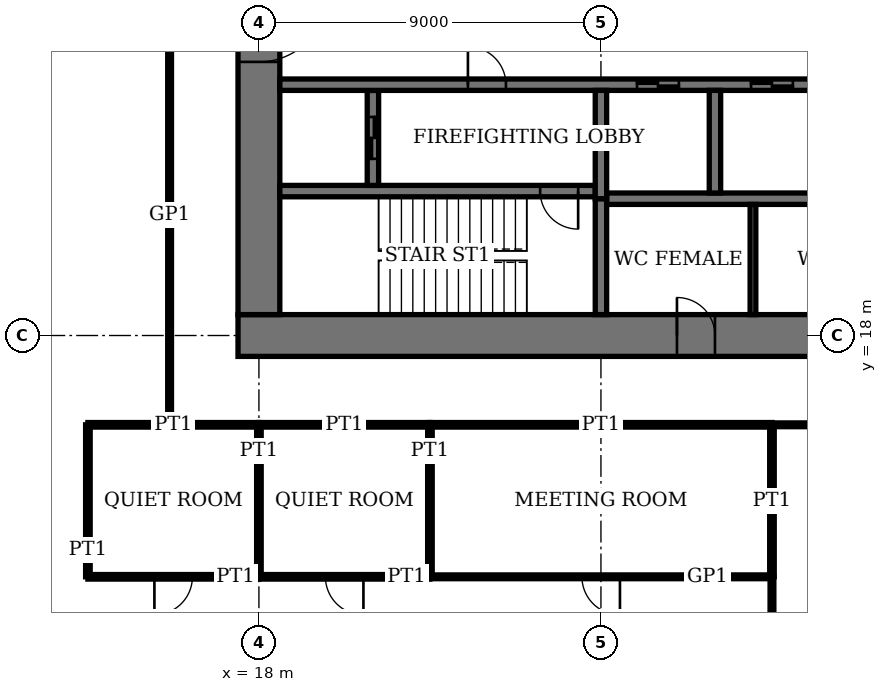
"""IFC4 building model, lengths in metres.
Left out: names, types, materials, properties, quantities, classifications, styles, units other than length and angle.
Written with IfcOpenShell. Run it as: python <this file> out.ifc"""

import sys

from ifc_helpers import new_model, si_unit, direction, frame, frame_2d, origin, place, context, subcontext, project, spatial, rectangle, extrude, element, fill, save


model = new_model("IFC4")
c1 = context("Model", 3, precision=1e-05, world=origin(), true_north=direction((0.0, 1.0)))
c2 = subcontext(c1, "Body", "Model", "MODEL_VIEW")
j1 = project(units=[si_unit("LENGTHUNIT", "METRE"), si_unit("PLANEANGLEUNIT", "RADIAN")], contexts=[c1])
p1 = place(None, origin())
s1 = spatial("IfcSite", under=j1, at=p1, CompositionType="ELEMENT")
p2 = place(p1, origin())
s2 = spatial("IfcBuilding", under=s1, at=p2, CompositionType="ELEMENT")
p3 = place(p2, frame((0.0, 0.0, 67.8)))
s3 = spatial("IfcBuildingStorey", under=s2, at=p3, CompositionType="ELEMENT", Elevation=67.8)
p4 = place(p3, frame((17.45, 18.0, 0.0), z_axis=(0.0, 0.0, 1.0), x_axis=(1.0, 0.0, 0.0)))
e1 = element("IfcWall", 1, at=p4, inside=s3, PredefinedType="SHEAR", context=c2, shape_type="SweptSolid", body=[
    extrude(rectangle(XDim=28.1, YDim=1.1, at=frame_2d((14.05, 0.0))), origin(), (0.0, 0.0, 1.0), 4.0),
])
p5 = place(p4, frame((11.55, 0.0, 0.0)))
e2 = element("IfcOpeningElement", 2, at=p5, cuts=e1, PredefinedType="OPENING", context=c2, shape_type="SweptSolid", body=[
    extrude(rectangle(XDim=1.0, YDim=2.4, at=frame_2d((0.5, 1.2))), frame((0.0, 0.56, 0.0), z_axis=(0.0, -1.0, 0.0), x_axis=(1.0, 0.0, 0.0)), (0.0, 0.0, 1.0), 1.12),
])
p6 = place(p4, frame((16.55, 0.0, 0.0)))
e3 = element("IfcOpeningElement", 3, at=p6, cuts=e1, PredefinedType="OPENING", context=c2, shape_type="SweptSolid", body=[
    extrude(rectangle(XDim=1.0, YDim=2.4, at=frame_2d((0.5, 1.2))), frame((0.0, 0.56, 0.0), z_axis=(0.0, -1.0, 0.0), x_axis=(1.0, 0.0, 0.0)), (0.0, 0.0, 1.0), 1.12),
])
p7 = place(p4, frame((20.0, 0.0, 0.0)))
e4 = element("IfcOpeningElement", 4, at=p7, cuts=e1, PredefinedType="OPENING", context=c2, shape_type="SweptSolid", body=[
    extrude(rectangle(XDim=1.1, YDim=2.4, at=frame_2d((0.55, 1.2))), frame((0.0, 0.56, 0.0), z_axis=(0.0, -1.0, 0.0), x_axis=(1.0, 0.0, 0.0)), (0.0, 0.0, 1.0), 1.12),
])
p8 = place(p4, frame((24.05, 0.0, 0.0)))
e5 = element("IfcOpeningElement", 5, at=p8, cuts=e1, PredefinedType="OPENING", context=c2, shape_type="SweptSolid", body=[
    extrude(rectangle(XDim=1.0, YDim=2.4, at=frame_2d((0.5, 1.2))), frame((0.0, 0.56, 0.0), z_axis=(0.0, -1.0, 0.0), x_axis=(1.0, 0.0, 0.0)), (0.0, 0.0, 1.0), 1.12),
])
p9 = place(p3, frame((18.0, 35.45, 0.0), z_axis=(0.0, 0.0, 1.0), x_axis=(0.0, -1.0, 0.0)))
e6 = element("IfcWall", 6, at=p9, inside=s3, PredefinedType="SHEAR", context=c2, shape_type="SweptSolid", body=[
    extrude(rectangle(XDim=16.9, YDim=1.1, at=frame_2d((8.45, 0.0))), origin(), (0.0, 0.0, 1.0), 4.0),
])
p10 = place(p9, frame((8.45, 0.0, 0.0)))
e7 = element("IfcOpeningElement", 7, at=p10, cuts=e6, PredefinedType="OPENING", context=c2, shape_type="SweptSolid", body=[
    extrude(rectangle(XDim=1.8, YDim=2.4, at=frame_2d((0.9, 1.2))), frame((0.0, 0.56, 0.0), z_axis=(0.0, -1.0, 0.0), x_axis=(1.0, 0.0, 0.0)), (0.0, 0.0, 1.0), 1.12),
])
p11 = place(p3, frame((18.55, 21.8, 0.0), z_axis=(0.0, 0.0, 1.0), x_axis=(1.0, 0.0, 0.0)))
e8 = element("IfcWall", 8, at=p11, inside=s3, PredefinedType="SHEAR", context=c2, shape_type="SweptSolid", body=[
    extrude(rectangle(XDim=8.3, YDim=0.3, at=frame_2d((4.15, 0.0))), origin(), (0.0, 0.0, 1.0), 4.0),
])
p12 = place(p11, frame((6.85, 0.0, 0.0)))
e9 = element("IfcOpeningElement", 9, at=p12, cuts=e8, PredefinedType="OPENING", context=c2, shape_type="SweptSolid", body=[
    extrude(rectangle(XDim=1.0, YDim=2.4, at=frame_2d((0.5, 1.2))), frame((0.0, 0.16, 0.0), z_axis=(0.0, -1.0, 0.0), x_axis=(1.0, 0.0, 0.0)), (0.0, 0.0, 1.0), 0.32),
])
p13 = place(p3, frame((27.0, 18.55, 0.0), z_axis=(0.0, 0.0, 1.0), x_axis=(0.0, 1.0, 0.0)))
e10 = element("IfcWall", 10, at=p13, inside=s3, PredefinedType="SHEAR", context=c2, shape_type="SweptSolid", body=[
    extrude(rectangle(XDim=3.05, YDim=0.3, at=frame_2d((1.525, 0.0))), origin(), (0.0, 0.0, 1.0), 4.0),
])
p14 = place(p3, frame((21.0, 21.95, 0.0), z_axis=(0.0, 0.0, 1.0), x_axis=(0.0, 1.0, 0.0)))
e11 = element("IfcWall", 11, at=p14, inside=s3, PredefinedType="SHEAR", context=c2, shape_type="SweptSolid", body=[
    extrude(rectangle(XDim=2.5, YDim=0.3, at=frame_2d((1.25, 0.0))), origin(), (0.0, 0.0, 1.0), 4.0),
])
p15 = place(p14, frame((0.7, 0.0, 0.0)))
e12 = element("IfcOpeningElement", 12, at=p15, cuts=e11, PredefinedType="OPENING", context=c2, shape_type="SweptSolid", body=[
    extrude(rectangle(XDim=1.1, YDim=2.4, at=frame_2d((0.55, 1.2))), frame((0.0, 0.16, 0.0), z_axis=(0.0, -1.0, 0.0), x_axis=(1.0, 0.0, 0.0)), (0.0, 0.0, 1.0), 0.32),
])
p16 = place(p3, frame((18.55, 24.6, 0.0), z_axis=(0.0, 0.0, 1.0), x_axis=(1.0, 0.0, 0.0)))
e13 = element("IfcWall", 13, at=p16, inside=s3, PredefinedType="SHEAR", context=c2, shape_type="SweptSolid", body=[
    extrude(rectangle(XDim=25.9, YDim=0.3, at=frame_2d((12.95, 0.0))), origin(), (0.0, 0.0, 1.0), 4.0),
])
p17 = place(p16, frame((4.95, 0.0, 0.0)))
e14 = element("IfcOpeningElement", 14, at=p17, cuts=e13, PredefinedType="OPENING", context=c2, shape_type="SweptSolid", body=[
    extrude(rectangle(XDim=1.0, YDim=2.4, at=frame_2d((0.5, 1.2))), frame((0.0, 0.16, 0.0), z_axis=(0.0, -1.0, 0.0), x_axis=(1.0, 0.0, 0.0)), (0.0, 0.0, 1.0), 0.32),
])
p18 = place(p16, frame((24.5, 0.0, 0.0)))
e15 = element("IfcOpeningElement", 15, at=p18, cuts=e13, PredefinedType="OPENING", context=c2, shape_type="SweptSolid", body=[
    extrude(rectangle(XDim=0.9, YDim=2.1, at=frame_2d((0.45, 1.05))), frame((0.0, 0.16, 0.0), z_axis=(0.0, -1.0, 0.0), x_axis=(1.0, 0.0, 0.0)), (0.0, 0.0, 1.0), 0.32),
])
p19 = place(p16, frame((9.4, 0.0, 0.0)))
e16 = element("IfcOpeningElement", 16, at=p19, cuts=e13, PredefinedType="OPENING", context=c2, shape_type="SweptSolid", body=[
    extrude(rectangle(XDim=1.1, YDim=2.4, at=frame_2d((0.55, 1.2))), frame((0.0, 0.16, 0.0), z_axis=(0.0, -1.0, 0.0), x_axis=(1.0, 0.0, 0.0)), (0.0, 0.0, 1.0), 0.32),
])
p20 = place(p16, frame((12.4, 0.0, 0.0)))
e17 = element("IfcOpeningElement", 17, at=p20, cuts=e13, PredefinedType="OPENING", context=c2, shape_type="SweptSolid", body=[
    extrude(rectangle(XDim=1.1, YDim=2.4, at=frame_2d((0.55, 1.2))), frame((0.0, 0.16, 0.0), z_axis=(0.0, -1.0, 0.0), x_axis=(1.0, 0.0, 0.0)), (0.0, 0.0, 1.0), 0.32),
])
p21 = place(p16, frame((15.4, 0.0, 0.0)))
e18 = element("IfcOpeningElement", 18, at=p21, cuts=e13, PredefinedType="OPENING", context=c2, shape_type="SweptSolid", body=[
    extrude(rectangle(XDim=1.1, YDim=2.4, at=frame_2d((0.55, 1.2))), frame((0.0, 0.16, 0.0), z_axis=(0.0, -1.0, 0.0), x_axis=(1.0, 0.0, 0.0)), (0.0, 0.0, 1.0), 0.32),
])
p22 = place(p16, frame((18.4, 0.0, 0.0)))
e19 = element("IfcOpeningElement", 19, at=p22, cuts=e13, PredefinedType="OPENING", context=c2, shape_type="SweptSolid", body=[
    extrude(rectangle(XDim=1.1, YDim=2.4, at=frame_2d((0.55, 1.2))), frame((0.0, 0.16, 0.0), z_axis=(0.0, -1.0, 0.0), x_axis=(1.0, 0.0, 0.0)), (0.0, 0.0, 1.0), 0.32),
])
p23 = place(p16, frame((21.3, 0.0, 0.0)))
e20 = element("IfcOpeningElement", 20, at=p23, cuts=e13, PredefinedType="OPENING", context=c2, shape_type="SweptSolid", body=[
    extrude(rectangle(XDim=1.3, YDim=2.4, at=frame_2d((0.65, 1.2))), frame((0.0, 0.16, 0.0), z_axis=(0.0, -1.0, 0.0), x_axis=(1.0, 0.0, 0.0)), (0.0, 0.0, 1.0), 0.32),
])
p24 = place(p3, frame((27.15, 21.6, 0.0), z_axis=(0.0, 0.0, 1.0), x_axis=(1.0, 0.0, 0.0)))
e21 = element("IfcWall", 21, at=p24, inside=s3, PredefinedType="SHEAR", context=c2, shape_type="SweptSolid", body=[
    extrude(rectangle(XDim=17.3, YDim=0.3, at=frame_2d((8.65, 0.0))), origin(), (0.0, 0.0, 1.0), 4.0),
])
p25 = place(p3, frame((30.0, 21.75, 0.0), z_axis=(0.0, 0.0, 1.0), x_axis=(0.0, 1.0, 0.0)))
e22 = element("IfcWall", 22, at=p25, inside=s3, PredefinedType="SHEAR", context=c2, shape_type="SweptSolid", body=[
    extrude(rectangle(XDim=2.7, YDim=0.3, at=frame_2d((1.35, 0.0))), origin(), (0.0, 0.0, 1.0), 4.0),
])
p26 = place(p3, frame((27.0, 21.6, 0.0), z_axis=(0.0, 0.0, 1.0), x_axis=(0.0, 1.0, 0.0)))
e23 = element("IfcWall", 23, at=p26, inside=s3, PredefinedType="SHEAR", context=c2, shape_type="SweptSolid", body=[
    extrude(rectangle(XDim=2.85, YDim=0.3, at=frame_2d((1.425, 0.0))), origin(), (0.0, 0.0, 1.0), 4.0),
])
p27 = place(p3, frame((13.5, 11.65, 0.0), z_axis=(0.0, 0.0, 1.0), x_axis=(1.0, 0.0, 0.0)))
e24 = element("IfcWall", 24, at=p27, inside=s3, PredefinedType="PARTITIONING", context=c2, shape_type="SweptSolid", body=[
    extrude(rectangle(XDim=4.5, YDim=0.12, at=frame_2d((2.25, 0.0))), origin(), (0.0, 0.0, 1.0), 3.75),
])
p28 = place(p27, frame((1.75, 0.0, 0.0)))
e25 = element("IfcOpeningElement", 25, at=p28, cuts=e24, PredefinedType="OPENING", context=c2, shape_type="SweptSolid", body=[
    extrude(rectangle(XDim=1.0, YDim=2.4, at=frame_2d((0.5, 1.2))), frame((0.0, 0.07, 0.0), z_axis=(0.0, -1.0, 0.0), x_axis=(1.0, 0.0, 0.0)), (0.0, 0.0, 1.0), 0.14),
])
p29 = place(p3, frame((18.0, 11.65, 0.0), z_axis=(0.0, 0.0, 1.0), x_axis=(1.0, 0.0, 0.0)))
e26 = element("IfcWall", 26, at=p29, inside=s3, PredefinedType="PARTITIONING", context=c2, shape_type="SweptSolid", body=[
    extrude(rectangle(XDim=4.5, YDim=0.12, at=frame_2d((2.25, 0.0))), origin(), (0.0, 0.0, 1.0), 3.75),
])
p30 = place(p29, frame((1.75, 0.0, 0.0)))
e27 = element("IfcOpeningElement", 27, at=p30, cuts=e26, PredefinedType="OPENING", context=c2, shape_type="SweptSolid", body=[
    extrude(rectangle(XDim=1.0, YDim=2.4, at=frame_2d((0.5, 1.2))), frame((0.0, 0.07, 0.0), z_axis=(0.0, -1.0, 0.0), x_axis=(1.0, 0.0, 0.0)), (0.0, 0.0, 1.0), 0.14),
])
p31 = place(p3, frame((22.5, 11.65, 0.0), z_axis=(0.0, 0.0, 1.0), x_axis=(1.0, 0.0, 0.0)))
e28 = element("IfcWall", 28, at=p31, inside=s3, PredefinedType="PARTITIONING", context=c2, shape_type="SweptSolid", body=[
    extrude(rectangle(XDim=9.0, YDim=0.1, at=frame_2d((4.5, 0.0))), origin(), (0.0, 0.0, 1.0), 3.75),
])
p32 = place(p31, frame((4.0, 0.0, 0.0)))
e29 = element("IfcOpeningElement", 29, at=p32, cuts=e28, PredefinedType="OPENING", context=c2, shape_type="SweptSolid", body=[
    extrude(rectangle(XDim=1.0, YDim=2.4, at=frame_2d((0.5, 1.2))), frame((0.0, 0.06, 0.0), z_axis=(0.0, -1.0, 0.0), x_axis=(1.0, 0.0, 0.0)), (0.0, 0.0, 1.0), 0.12),
])
for number, where, z_axis, x_axis in (
    (30, (13.5, 15.65, 0.0), (0.0, 0.0, 1.0), (1.0, 0.0, 0.0)),
    (31, (18.0, 15.65, 0.0), (0.0, 0.0, 1.0), (1.0, 0.0, 0.0)),
):
    element("IfcWall", number, at=place(p3, frame(where, z_axis=z_axis, x_axis=x_axis)), inside=s3, PredefinedType="PARTITIONING", context=c2, shape_type="SweptSolid", body=[
        extrude(rectangle(XDim=4.5, YDim=0.12, at=frame_2d((2.25, 0.0))), origin(), (0.0, 0.0, 1.0), 3.75),
    ])
p33 = place(p3, frame((22.5, 15.65, 0.0), z_axis=(0.0, 0.0, 1.0), x_axis=(1.0, 0.0, 0.0)))
e32 = element("IfcWall", 32, at=p33, inside=s3, PredefinedType="PARTITIONING", context=c2, shape_type="SweptSolid", body=[
    extrude(rectangle(XDim=9.0, YDim=0.12, at=frame_2d((4.5, 0.0))), origin(), (0.0, 0.0, 1.0), 3.75),
])
p34 = place(p3, frame((31.5, 15.65, 0.0), z_axis=(0.0, 0.0, 1.0), x_axis=(1.0, 0.0, 0.0)))
e33 = element("IfcWall", 33, at=p34, inside=s3, PredefinedType="PARTITIONING", context=c2, shape_type="SweptSolid", body=[
    extrude(rectangle(XDim=9.0, YDim=0.1, at=frame_2d((4.5, 0.0))), origin(), (0.0, 0.0, 1.0), 3.75),
])
p35 = place(p34, frame((4.0, 0.0, 0.0)))
e34 = element("IfcOpeningElement", 34, at=p35, cuts=e33, PredefinedType="OPENING", context=c2, shape_type="SweptSolid", body=[
    extrude(rectangle(XDim=1.0, YDim=2.4, at=frame_2d((0.5, 1.2))), frame((0.0, 0.06, 0.0), z_axis=(0.0, -1.0, 0.0), x_axis=(1.0, 0.0, 0.0)), (0.0, 0.0, 1.0), 0.12),
])
p36 = place(p3, frame((13.5, 11.65, 0.0), z_axis=(0.0, 0.0, 1.0), x_axis=(0.0, 1.0, 0.0)))
e35 = element("IfcWall", 35, at=p36, inside=s3, PredefinedType="PARTITIONING", context=c2, shape_type="SweptSolid", body=[
    extrude(rectangle(XDim=4.0, YDim=0.12, at=frame_2d((2.0, 0.0))), origin(), (0.0, 0.0, 1.0), 3.75),
])
p37 = place(p3, frame((15.65, 15.65, 0.0), z_axis=(0.0, 0.0, 1.0), x_axis=(0.0, 1.0, 0.0)))
e36 = element("IfcWall", 36, at=p37, inside=s3, PredefinedType="PARTITIONING", context=c2, shape_type="SweptSolid", body=[
    extrude(rectangle(XDim=22.7, YDim=0.1, at=frame_2d((11.35, 0.0))), origin(), (0.0, 0.0, 1.0), 3.75),
])
p38 = place(p37, frame((10.85, 0.0, 0.0)))
e37 = element("IfcOpeningElement", 37, at=p38, cuts=e36, PredefinedType="OPENING", context=c2, shape_type="SweptSolid", body=[
    extrude(rectangle(XDim=1.0, YDim=2.4, at=frame_2d((0.5, 1.2))), frame((0.0, 0.06, 0.0), z_axis=(0.0, -1.0, 0.0), x_axis=(1.0, 0.0, 0.0)), (0.0, 0.0, 1.0), 0.12),
])
p39 = place(p3, frame((18.0, 11.65, 0.0), z_axis=(0.0, 0.0, 1.0), x_axis=(0.0, 1.0, 0.0)))
e38 = element("IfcWall", 38, at=p39, inside=s3, PredefinedType="PARTITIONING", context=c2, shape_type="SweptSolid", body=[
    extrude(rectangle(XDim=4.0, YDim=0.12, at=frame_2d((2.0, 0.0))), origin(), (0.0, 0.0, 1.0), 3.05),
])
for number, where, z_axis, x_axis in (
    (39, (22.5, 11.65, 0.0), (0.0, 0.0, 1.0), (0.0, 1.0, 0.0)),
    (40, (31.5, 11.65, 0.0), (0.0, 0.0, 1.0), (0.0, 1.0, 0.0)),
):
    element("IfcWall", number, at=place(p3, frame(where, z_axis=z_axis, x_axis=x_axis)), inside=s3, PredefinedType="PARTITIONING", context=c2, shape_type="SweptSolid", body=[
        extrude(rectangle(XDim=4.0, YDim=0.12, at=frame_2d((2.0, 0.0))), origin(), (0.0, 0.0, 1.0), 3.75),
    ])
p40 = place(p3, frame((31.5, 0.31, 0.0), z_axis=(0.0, 0.0, 1.0), x_axis=(0.0, 1.0, 0.0)))
e41 = element("IfcWall", 41, at=p40, inside=s3, PredefinedType="PARTITIONING", context=c2, shape_type="SweptSolid", body=[
    extrude(rectangle(XDim=11.34, YDim=0.1, at=frame_2d((5.67, 0.0))), origin(), (0.0, 0.0, 1.0), 3.75),
])
p41 = place(p3, frame((31.0, 18.55, 0.0), z_axis=(0.0, 0.0, 1.0), x_axis=(0.0, 1.0, 0.0)))
e42 = element("IfcWall", 42, at=p41, inside=s3, PredefinedType="PARTITIONING", context=c2, shape_type="SweptSolid", body=[
    extrude(rectangle(XDim=2.9, YDim=0.15, at=frame_2d((1.45, 0.0))), origin(), (0.0, 0.0, 1.0), 3.75),
])
p42 = place(p10, origin())
e43 = element("IfcDoor", 43, at=p42, inside=s3, OperationType="DOUBLE_DOOR_DOUBLE_SWING", PredefinedType="DOOR", context=c2, shape_type="SweptSolid", body=[
    extrude(rectangle(XDim=1.8, YDim=2.4, at=frame_2d((0.9, 1.2))), frame((0.0, 0.03, 0.0), z_axis=(0.0, -1.0, 0.0), x_axis=(1.0, 0.0, 0.0)), (0.0, 0.0, 1.0), 0.06),
    extrude(rectangle(XDim=0.04, YDim=2.4, at=frame_2d((0.02, 1.2))), frame((0.0, 0.55, 0.0), z_axis=(0.0, -1.0, 0.0), x_axis=(1.0, 0.0, 0.0)), (0.0, 0.0, 1.0), 1.1),
    extrude(rectangle(XDim=0.04, YDim=2.4, at=frame_2d((1.78, 1.2))), frame((0.0, 0.55, 0.0), z_axis=(0.0, -1.0, 0.0), x_axis=(1.0, 0.0, 0.0)), (0.0, 0.0, 1.0), 1.1),
    extrude(rectangle(XDim=1.8, YDim=0.04, at=frame_2d((0.9, 2.38))), frame((0.0, 0.55, 0.0), z_axis=(0.0, -1.0, 0.0), x_axis=(1.0, 0.0, 0.0)), (0.0, 0.0, 1.0), 1.1),
])
fill(e7, e43)
p43 = place(p5, origin())
e44 = element("IfcDoor", 44, at=p43, inside=s3, OperationType="SINGLE_SWING_RIGHT", PredefinedType="DOOR", context=c2, shape_type="SweptSolid", body=[
    extrude(rectangle(XDim=1.0, YDim=2.4, at=frame_2d((0.5, 1.2))), frame((0.0, 0.025, 0.0), z_axis=(0.0, -1.0, 0.0), x_axis=(1.0, 0.0, 0.0)), (0.0, 0.0, 1.0), 0.05),
    extrude(rectangle(XDim=0.04, YDim=2.4, at=frame_2d((0.02, 1.2))), frame((0.0, 0.4, 0.0), z_axis=(0.0, -1.0, 0.0), x_axis=(1.0, 0.0, 0.0)), (0.0, 0.0, 1.0), 0.8),
    extrude(rectangle(XDim=0.04, YDim=2.4, at=frame_2d((0.98, 1.2))), frame((0.0, 0.4, 0.0), z_axis=(0.0, -1.0, 0.0), x_axis=(1.0, 0.0, 0.0)), (0.0, 0.0, 1.0), 0.8),
    extrude(rectangle(XDim=1.0, YDim=0.04, at=frame_2d((0.5, 2.38))), frame((0.0, 0.4, 0.0), z_axis=(0.0, -1.0, 0.0), x_axis=(1.0, 0.0, 0.0)), (0.0, 0.0, 1.0), 0.8),
])
fill(e2, e44)
p44 = place(p12, origin())
e45 = element("IfcDoor", 45, at=p44, inside=s3, OperationType="SINGLE_SWING_RIGHT", PredefinedType="DOOR", context=c2, shape_type="SweptSolid", body=[
    extrude(rectangle(XDim=1.0, YDim=2.4, at=frame_2d((0.5, 1.2))), frame((0.0, 0.03, 0.0), z_axis=(0.0, -1.0, 0.0), x_axis=(1.0, 0.0, 0.0)), (0.0, 0.0, 1.0), 0.06),
])
fill(e9, e45)
p45 = place(p17, origin())
e46 = element("IfcDoor", 46, at=p45, inside=s3, OperationType="SINGLE_SWING_RIGHT", PredefinedType="DOOR", context=c2, shape_type="SweptSolid", body=[
    extrude(rectangle(XDim=1.0, YDim=2.4, at=frame_2d((0.5, 1.2))), frame((0.0, 0.03, 0.0), z_axis=(0.0, -1.0, 0.0), x_axis=(1.0, 0.0, 0.0)), (0.0, 0.0, 1.0), 0.06),
])
fill(e14, e46)
p46 = place(p28, origin())
e47 = element("IfcDoor", 47, at=p46, inside=s3, OperationType="SINGLE_SWING_LEFT", PredefinedType="DOOR", context=c2, shape_type="SweptSolid", body=[
    extrude(rectangle(XDim=1.0, YDim=2.4, at=frame_2d((0.5, 1.2))), frame((0.0, 0.025, 0.0), z_axis=(0.0, -1.0, 0.0), x_axis=(1.0, 0.0, 0.0)), (0.0, 0.0, 1.0), 0.05),
])
fill(e25, e47)
p47 = place(p30, origin())
e48 = element("IfcDoor", 48, at=p47, inside=s3, OperationType="SINGLE_SWING_RIGHT", PredefinedType="DOOR", context=c2, shape_type="SweptSolid", body=[
    extrude(rectangle(XDim=1.0, YDim=2.4, at=frame_2d((0.5, 1.2))), frame((0.0, 0.025, 0.0), z_axis=(0.0, -1.0, 0.0), x_axis=(1.0, 0.0, 0.0)), (0.0, 0.0, 1.0), 0.05),
])
fill(e27, e48)
p48 = place(p32, origin())
e49 = element("IfcDoor", 49, at=p48, inside=s3, OperationType="SINGLE_SWING_RIGHT", PredefinedType="DOOR", context=c2, shape_type="SweptSolid", body=[
    extrude(rectangle(XDim=1.0, YDim=2.4, at=frame_2d((0.5, 1.2))), frame((0.0, 0.02, 0.0), z_axis=(0.0, -1.0, 0.0), x_axis=(1.0, 0.0, 0.0)), (0.0, 0.0, 1.0), 0.04),
])
fill(e29, e49)
p49 = place(p19, origin())
e50 = element("IfcDoor", 50, at=p49, inside=s3, OperationType="DOUBLE_DOOR_SLIDING", PredefinedType="DOOR", context=c2, shape_type="SweptSolid", body=[
    extrude(rectangle(XDim=1.1, YDim=2.4, at=frame_2d((0.55, 1.2))), frame((0.0, 0.02, 0.0), z_axis=(0.0, -1.0, 0.0), x_axis=(1.0, 0.0, 0.0)), (0.0, 0.0, 1.0), 0.04),
])
fill(e16, e50)
p50 = place(p20, origin())
e51 = element("IfcDoor", 51, at=p50, inside=s3, OperationType="DOUBLE_DOOR_SLIDING", PredefinedType="DOOR", context=c2, shape_type="SweptSolid", body=[
    extrude(rectangle(XDim=1.1, YDim=2.4, at=frame_2d((0.55, 1.2))), frame((0.0, 0.02, 0.0), z_axis=(0.0, -1.0, 0.0), x_axis=(1.0, 0.0, 0.0)), (0.0, 0.0, 1.0), 0.04),
])
fill(e17, e51)
p51 = place(p15, origin())
e52 = element("IfcDoor", 52, at=p51, inside=s3, OperationType="DOUBLE_DOOR_SLIDING", PredefinedType="DOOR", context=c2, shape_type="SweptSolid", body=[
    extrude(rectangle(XDim=1.1, YDim=2.4, at=frame_2d((0.55, 1.2))), frame((0.0, 0.03, 0.0), z_axis=(0.0, -1.0, 0.0), x_axis=(1.0, 0.0, 0.0)), (0.0, 0.0, 1.0), 0.06),
])
fill(e12, e52)
save(model, sys.argv[1])
